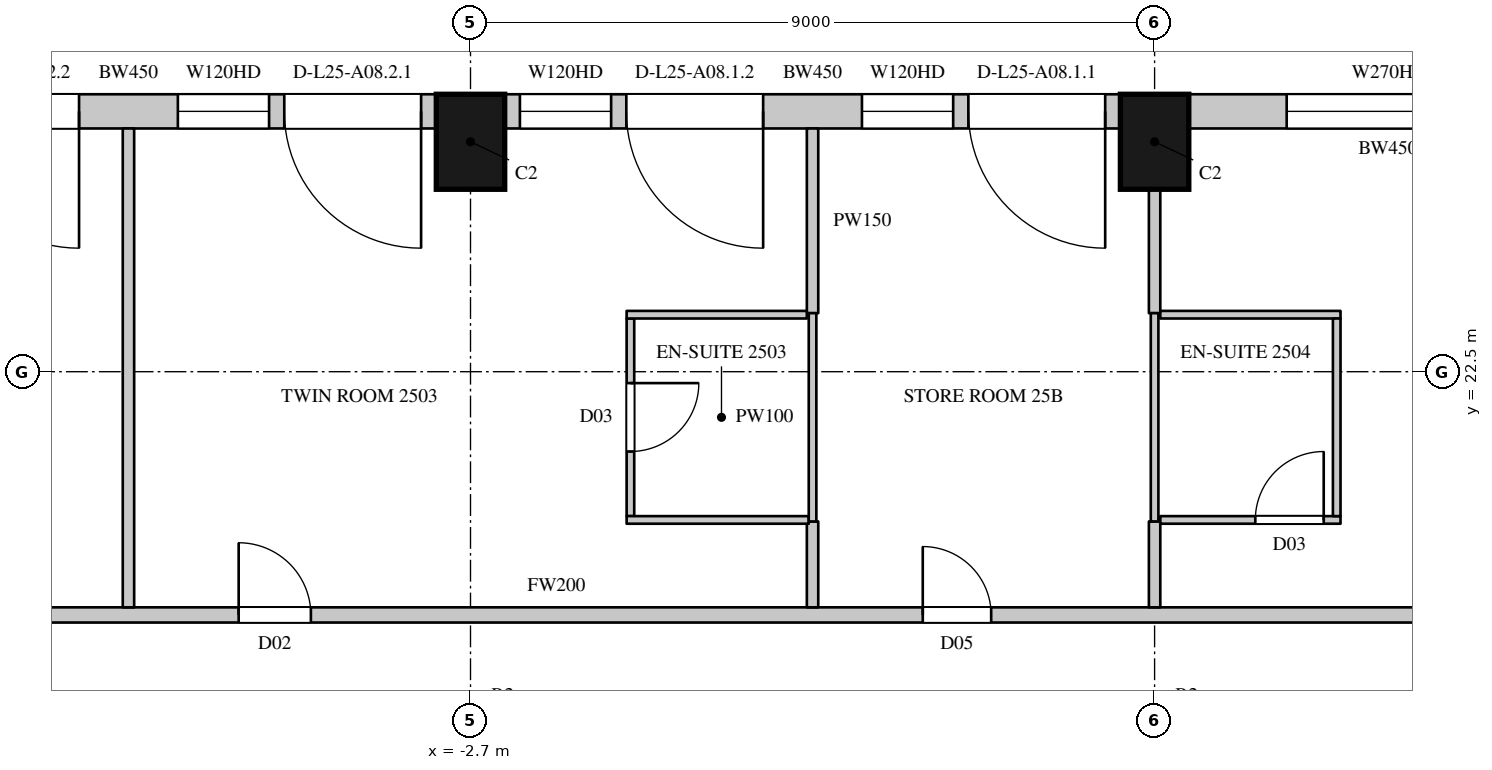
"""IFC4 building model, lengths in metres.
Left out: names, types, materials, properties, quantities, classifications, styles, units other than length and angle.
Written with IfcOpenShell. Run it as: python <this file> out.ifc"""

import sys

from ifc_helpers import new_model, si_unit, direction, frame, frame_2d, origin, origin_2d, place, context, subcontext, project, spatial, rectangle, extrude, element, fill, save


model = new_model("IFC4")
c1 = context("Model", 3, precision=1e-05, world=origin(), true_north=direction((0.0, 1.0)))
c2 = subcontext(c1, "Body", "Model", "MODEL_VIEW")
j1 = project(units=[si_unit("LENGTHUNIT", "METRE"), si_unit("PLANEANGLEUNIT", "RADIAN")], contexts=[c1])
p1 = place(None, origin())
s1 = spatial("IfcSite", under=j1, at=p1, CompositionType="ELEMENT")
p2 = place(p1, origin())
s2 = spatial("IfcBuilding", under=s1, at=p2, CompositionType="ELEMENT")
p3 = place(p2, frame((0.0, 0.0, 120.3)))
s3 = spatial("IfcBuildingStorey", under=s2, at=p3, CompositionType="ELEMENT", Elevation=120.3)
for number, where, z_axis, x_axis in (
    (1, (6.3, 25.525, 0.0), (0.0, 0.0, 1.0), (-1.0, 0.0, 0.0)),
    (2, (-2.7, 25.525, 0.0), (0.0, 0.0, 1.0), (-1.0, 0.0, 0.0)),
):
    element("IfcColumn", number, at=place(p3, frame(where, z_axis=z_axis, x_axis=x_axis)), inside=s3, PredefinedType="COLUMN", context=c2, shape_type="SweptSolid", body=[
        extrude(rectangle(XDim=0.9, YDim=1.25, at=origin_2d()), origin(), (0.0, 0.0, 1.0), 3.6),
    ])
p4 = place(p3, frame((11.989, 25.925, 0.0), z_axis=(0.0, 0.0, 1.0), x_axis=(-1.0, 0.0, 0.0)))
e3 = element("IfcWall", 3, at=p4, inside=s3, PredefinedType="SOLIDWALL", context=c2, shape_type="SweptSolid", body=[
    extrude(rectangle(XDim=5.239, YDim=0.45, at=frame_2d((2.619, 0.0))), origin(), (0.0, 0.0, 1.0), 3.3),
])
p5 = place(p4, frame((1.251, 0.0, 1.05)))
e4 = element("IfcOpeningElement", 4, at=p5, cuts=e3, PredefinedType="OPENING", context=c2, shape_type="SweptSolid", body=[
    extrude(rectangle(XDim=2.7, YDim=2.0, at=frame_2d((1.35, 1.0))), frame((0.0, 0.235, 0.0), z_axis=(0.0, -1.0, 0.0), x_axis=(1.0, 0.0, 0.0)), (0.0, 0.0, 1.0), 0.47),
])
p6 = place(p3, frame((5.85, 25.925, 0.0), z_axis=(0.0, 0.0, 1.0), x_axis=(-1.0, 0.0, 0.0)))
e5 = element("IfcWall", 5, at=p6, inside=s3, PredefinedType="SOLIDWALL", context=c2, shape_type="SweptSolid", body=[
    extrude(rectangle(XDim=8.1, YDim=0.45, at=frame_2d((4.05, 0.0))), origin(), (0.0, 0.0, 1.0), 3.3),
])
p7 = place(p6, frame((0.2, 0.0, 0.0)))
e6 = element("IfcOpeningElement", 6, at=p7, cuts=e5, PredefinedType="OPENING", context=c2, shape_type="SweptSolid", body=[
    extrude(rectangle(XDim=1.8, YDim=2.4, at=frame_2d((0.9, 1.2))), frame((0.0, 0.235, 0.0), z_axis=(0.0, -1.0, 0.0), x_axis=(1.0, 0.0, 0.0)), (0.0, 0.0, 1.0), 0.47),
])
p8 = place(p6, frame((2.2, 0.0, 1.05)))
e7 = element("IfcOpeningElement", 7, at=p8, cuts=e5, PredefinedType="OPENING", context=c2, shape_type="SweptSolid", body=[
    extrude(rectangle(XDim=1.2, YDim=2.0, at=frame_2d((0.6, 1.0))), frame((0.0, 0.235, 0.0), z_axis=(0.0, -1.0, 0.0), x_axis=(1.0, 0.0, 0.0)), (0.0, 0.0, 1.0), 0.47),
])
p9 = place(p6, frame((4.7, 0.0, 0.0)))
e8 = element("IfcOpeningElement", 8, at=p9, cuts=e5, PredefinedType="OPENING", context=c2, shape_type="SweptSolid", body=[
    extrude(rectangle(XDim=1.8, YDim=2.4, at=frame_2d((0.9, 1.2))), frame((0.0, 0.235, 0.0), z_axis=(0.0, -1.0, 0.0), x_axis=(1.0, 0.0, 0.0)), (0.0, 0.0, 1.0), 0.47),
])
p10 = place(p6, frame((6.7, 0.0, 1.05)))
e9 = element("IfcOpeningElement", 9, at=p10, cuts=e5, PredefinedType="OPENING", context=c2, shape_type="SweptSolid", body=[
    extrude(rectangle(XDim=1.2, YDim=2.0, at=frame_2d((0.6, 1.0))), frame((0.0, 0.235, 0.0), z_axis=(0.0, -1.0, 0.0), x_axis=(1.0, 0.0, 0.0)), (0.0, 0.0, 1.0), 0.47),
])
p11 = place(p3, frame((-3.15, 25.925, 0.0), z_axis=(0.0, 0.0, 1.0), x_axis=(-1.0, 0.0, 0.0)))
e10 = element("IfcWall", 10, at=p11, inside=s3, PredefinedType="SOLIDWALL", context=c2, shape_type="SweptSolid", body=[
    extrude(rectangle(XDim=8.1, YDim=0.45, at=frame_2d((4.05, 0.0))), origin(), (0.0, 0.0, 1.0), 3.3),
])
p12 = place(p11, frame((0.2, 0.0, 0.0)))
e11 = element("IfcOpeningElement", 11, at=p12, cuts=e10, PredefinedType="OPENING", context=c2, shape_type="SweptSolid", body=[
    extrude(rectangle(XDim=1.8, YDim=2.4, at=frame_2d((0.9, 1.2))), frame((0.0, 0.235, 0.0), z_axis=(0.0, -1.0, 0.0), x_axis=(1.0, 0.0, 0.0)), (0.0, 0.0, 1.0), 0.47),
])
p13 = place(p11, frame((2.2, 0.0, 1.05)))
e12 = element("IfcOpeningElement", 12, at=p13, cuts=e10, PredefinedType="OPENING", context=c2, shape_type="SweptSolid", body=[
    extrude(rectangle(XDim=1.2, YDim=2.0, at=frame_2d((0.6, 1.0))), frame((0.0, 0.235, 0.0), z_axis=(0.0, -1.0, 0.0), x_axis=(1.0, 0.0, 0.0)), (0.0, 0.0, 1.0), 0.47),
])
p14 = place(p11, frame((4.7, 0.0, 0.0)))
e13 = element("IfcOpeningElement", 13, at=p14, cuts=e10, PredefinedType="OPENING", context=c2, shape_type="SweptSolid", body=[
    extrude(rectangle(XDim=1.8, YDim=2.4, at=frame_2d((0.9, 1.2))), frame((0.0, 0.235, 0.0), z_axis=(0.0, -1.0, 0.0), x_axis=(1.0, 0.0, 0.0)), (0.0, 0.0, 1.0), 0.47),
])
p15 = place(p11, frame((6.7, 0.0, 1.05)))
e14 = element("IfcOpeningElement", 14, at=p15, cuts=e10, PredefinedType="OPENING", context=c2, shape_type="SweptSolid", body=[
    extrude(rectangle(XDim=1.2, YDim=2.0, at=frame_2d((0.6, 1.0))), frame((0.0, 0.235, 0.0), z_axis=(0.0, -1.0, 0.0), x_axis=(1.0, 0.0, 0.0)), (0.0, 0.0, 1.0), 0.47),
])
p16 = place(p3, frame((-20.8, 19.3, 0.0), z_axis=(0.0, 0.0, 1.0), x_axis=(1.0, 0.0, 0.0)))
e15 = element("IfcWall", 15, at=p16, inside=s3, PredefinedType="PARTITIONING", context=c2, shape_type="SweptSolid", body=[
    extrude(rectangle(XDim=38.464, YDim=0.2, at=frame_2d((19.232, 0.0))), origin(), (0.0, 0.0, 1.0), 3.3),
])
p17 = place(p16, frame((24.05, 0.0, 0.0)))
e16 = element("IfcOpeningElement", 16, at=p17, cuts=e15, PredefinedType="OPENING", context=c2, shape_type="SweptSolid", body=[
    extrude(rectangle(XDim=0.9, YDim=2.2, at=frame_2d((0.45, 1.1))), frame((0.0, 0.11, 0.0), z_axis=(0.0, -1.0, 0.0), x_axis=(1.0, 0.0, 0.0)), (0.0, 0.0, 1.0), 0.22),
])
p18 = place(p16, frame((11.2, 0.0, 0.0)))
e17 = element("IfcOpeningElement", 17, at=p18, cuts=e15, PredefinedType="OPENING", context=c2, shape_type="SweptSolid", body=[
    extrude(rectangle(XDim=0.95, YDim=2.2, at=frame_2d((0.475, 1.1))), frame((0.0, 0.11, 0.0), z_axis=(0.0, -1.0, 0.0), x_axis=(1.0, 0.0, 0.0)), (0.0, 0.0, 1.0), 0.22),
])
p19 = place(p16, frame((15.05, 0.0, 0.0)))
e18 = element("IfcOpeningElement", 18, at=p19, cuts=e15, PredefinedType="OPENING", context=c2, shape_type="SweptSolid", body=[
    extrude(rectangle(XDim=0.95, YDim=2.2, at=frame_2d((0.475, 1.1))), frame((0.0, 0.11, 0.0), z_axis=(0.0, -1.0, 0.0), x_axis=(1.0, 0.0, 0.0)), (0.0, 0.0, 1.0), 0.22),
])
p20 = place(p16, frame((32.0, 0.0, 0.0)))
e19 = element("IfcOpeningElement", 19, at=p20, cuts=e15, PredefinedType="OPENING", context=c2, shape_type="SweptSolid", body=[
    extrude(rectangle(XDim=0.95, YDim=2.2, at=frame_2d((0.475, 1.1))), frame((0.0, 0.11, 0.0), z_axis=(0.0, -1.0, 0.0), x_axis=(1.0, 0.0, 0.0)), (0.0, 0.0, 1.0), 0.22),
])
p21 = place(p3, frame((-7.2, 19.4, 0.0), z_axis=(0.0, 0.0, 1.0), x_axis=(0.0, 1.0, 0.0)))
e20 = element("IfcWall", 20, at=p21, inside=s3, PredefinedType="PARTITIONING", context=c2, shape_type="SweptSolid", body=[
    extrude(rectangle(XDim=6.3, YDim=0.15, at=frame_2d((3.15, 0.0))), origin(), (0.0, 0.0, 1.0), 2.65),
])
p22 = place(p3, frame((1.8, 19.4, 0.0), z_axis=(0.0, 0.0, 1.0), x_axis=(0.0, 1.0, 0.0)))
e21 = element("IfcWall", 21, at=p22, inside=s3, PredefinedType="PARTITIONING", context=c2, shape_type="SweptSolid", body=[
    extrude(rectangle(XDim=1.13, YDim=0.15, at=frame_2d((0.565, 0.0))), origin(), (0.0, 0.0, 1.0), 2.65),
])
p23 = place(p3, frame((1.8, 23.27, 0.0), z_axis=(0.0, 0.0, 1.0), x_axis=(0.0, 1.0, 0.0)))
e22 = element("IfcWall", 22, at=p23, inside=s3, PredefinedType="PARTITIONING", context=c2, shape_type="SweptSolid", body=[
    extrude(rectangle(XDim=2.43, YDim=0.15, at=frame_2d((1.215, 0.0))), origin(), (0.0, 0.0, 1.0), 2.65),
])
p24 = place(p3, frame((6.3, 19.4, 0.0), z_axis=(0.0, 0.0, 1.0), x_axis=(0.0, 1.0, 0.0)))
e23 = element("IfcWall", 23, at=p24, inside=s3, PredefinedType="PARTITIONING", context=c2, shape_type="SweptSolid", body=[
    extrude(rectangle(XDim=1.13, YDim=0.15, at=frame_2d((0.565, 0.0))), origin(), (0.0, 0.0, 1.0), 2.75),
])
p25 = place(p3, frame((6.3, 23.27, 0.0), z_axis=(0.0, 0.0, 1.0), x_axis=(0.0, 1.0, 0.0)))
e24 = element("IfcWall", 24, at=p25, inside=s3, PredefinedType="PARTITIONING", context=c2, shape_type="SweptSolid", body=[
    extrude(rectangle(XDim=1.63, YDim=0.15, at=frame_2d((0.815, 0.0))), origin(), (0.0, 0.0, 1.0), 2.75),
])
p26 = place(p3, frame((-0.596, 20.6, 0.0), z_axis=(0.0, 0.0, 1.0), x_axis=(0.0, 1.0, 0.0)))
e25 = element("IfcWall", 25, at=p26, inside=s3, PredefinedType="PARTITIONING", context=c2, shape_type="SweptSolid", body=[
    extrude(rectangle(XDim=2.6, YDim=0.1, at=frame_2d((1.3, 0.0))), origin(), (0.0, 0.0, 1.0), 3.3),
])
p27 = place(p26, frame((0.85, 0.0, 0.0)))
e26 = element("IfcOpeningElement", 26, at=p27, cuts=e25, PredefinedType="OPENING", context=c2, shape_type="SweptSolid", body=[
    extrude(rectangle(XDim=0.9, YDim=2.2, at=frame_2d((0.45, 1.1))), frame((0.0, 0.06, 0.0), z_axis=(0.0, -1.0, 0.0), x_axis=(1.0, 0.0, 0.0)), (0.0, 0.0, 1.0), 0.12),
])
p28 = place(p3, frame((-0.646, 20.55, 0.0), z_axis=(0.0, 0.0, 1.0), x_axis=(1.0, 0.0, 0.0)))
e27 = element("IfcWall", 27, at=p28, inside=s3, PredefinedType="PARTITIONING", context=c2, shape_type="SweptSolid", body=[
    extrude(rectangle(XDim=2.396, YDim=0.1, at=frame_2d((1.198, 0.0))), origin(), (0.0, 0.0, 1.0), 3.3),
])
p29 = place(p3, frame((-0.646, 23.25, 0.0), z_axis=(0.0, 0.0, 1.0), x_axis=(1.0, 0.0, 0.0)))
e28 = element("IfcWall", 28, at=p29, inside=s3, PredefinedType="PARTITIONING", context=c2, shape_type="SweptSolid", body=[
    extrude(rectangle(XDim=2.371, YDim=0.1, at=frame_2d((1.186, 0.0))), origin(), (0.0, 0.0, 1.0), 3.3),
])
p30 = place(p3, frame((1.8, 20.53, 0.0), z_axis=(0.0, 0.0, 1.0), x_axis=(0.0, 1.0, 0.0)))
e29 = element("IfcWall", 29, at=p30, inside=s3, PredefinedType="PARTITIONING", context=c2, shape_type="SweptSolid", body=[
    extrude(rectangle(XDim=2.74, YDim=0.1, at=frame_2d((1.37, 0.0))), origin(), (0.0, 0.0, 1.0), 2.65),
])
p31 = place(p3, frame((6.3, 20.53, 0.0), z_axis=(0.0, 0.0, 1.0), x_axis=(0.0, 1.0, 0.0)))
e30 = element("IfcWall", 30, at=p31, inside=s3, PredefinedType="PARTITIONING", context=c2, shape_type="SweptSolid", body=[
    extrude(rectangle(XDim=2.74, YDim=0.1, at=frame_2d((1.37, 0.0))), origin(), (0.0, 0.0, 1.0), 2.75),
])
p32 = place(p3, frame((6.375, 20.55, 0.0), z_axis=(0.0, 0.0, 1.0), x_axis=(1.0, 0.0, 0.0)))
e31 = element("IfcWall", 31, at=p32, inside=s3, PredefinedType="PARTITIONING", context=c2, shape_type="SweptSolid", body=[
    extrude(rectangle(XDim=2.371, YDim=0.1, at=frame_2d((1.186, 0.0))), origin(), (0.0, 0.0, 1.0), 3.3),
])
p33 = place(p32, frame((1.25, 0.0, 0.0)))
e32 = element("IfcOpeningElement", 32, at=p33, cuts=e31, PredefinedType="OPENING", context=c2, shape_type="SweptSolid", body=[
    extrude(rectangle(XDim=0.9, YDim=2.2, at=frame_2d((0.45, 1.1))), frame((0.0, 0.06, 0.0), z_axis=(0.0, -1.0, 0.0), x_axis=(1.0, 0.0, 0.0)), (0.0, 0.0, 1.0), 0.12),
])
p34 = place(p3, frame((6.375, 23.25, 0.0), z_axis=(0.0, 0.0, 1.0), x_axis=(1.0, 0.0, 0.0)))
e33 = element("IfcWall", 33, at=p34, inside=s3, PredefinedType="PARTITIONING", context=c2, shape_type="SweptSolid", body=[
    extrude(rectangle(XDim=2.371, YDim=0.1, at=frame_2d((1.186, 0.0))), origin(), (0.0, 0.0, 1.0), 3.3),
])
p35 = place(p3, frame((8.696, 20.6, 0.0), z_axis=(0.0, 0.0, 1.0), x_axis=(0.0, 1.0, 0.0)))
e34 = element("IfcWall", 34, at=p35, inside=s3, PredefinedType="PARTITIONING", context=c2, shape_type="SweptSolid", body=[
    extrude(rectangle(XDim=2.6, YDim=0.1, at=frame_2d((1.3, 0.0))), origin(), (0.0, 0.0, 1.0), 3.3),
])
p36 = place(p5, origin())
e35 = element("IfcWindow", 35, at=p36, inside=s3, PartitioningType="SINGLE_PANEL", PredefinedType="WINDOW", context=c2, shape_type="SweptSolid", body=[
    extrude(rectangle(XDim=2.7, YDim=2.0, at=frame_2d((1.35, 1.0))), frame((0.0, 0.135, 0.0), z_axis=(0.0, -1.0, 0.0), x_axis=(1.0, 0.0, 0.0)), (0.0, 0.0, 1.0), 0.06),
])
fill(e4, e35)
p37 = place(p7, origin())
e36 = element("IfcDoor", 36, at=p37, inside=s3, OperationType="SLIDING_TO_LEFT", PredefinedType="DOOR", context=c2, shape_type="SweptSolid", body=[
    extrude(rectangle(XDim=1.8, YDim=2.4, at=frame_2d((0.9, 1.2))), frame((0.0, 0.13, 0.0), z_axis=(0.0, -1.0, 0.0), x_axis=(1.0, 0.0, 0.0)), (0.0, 0.0, 1.0), 0.05),
])
fill(e6, e36)
p38 = place(p8, origin())
e37 = element("IfcWindow", 37, at=p38, inside=s3, PartitioningType="SINGLE_PANEL", PredefinedType="WINDOW", context=c2, shape_type="SweptSolid", body=[
    extrude(rectangle(XDim=1.2, YDim=2.0, at=frame_2d((0.6, 1.0))), frame((0.0, 0.135, 0.0), z_axis=(0.0, -1.0, 0.0), x_axis=(1.0, 0.0, 0.0)), (0.0, 0.0, 1.0), 0.06),
])
fill(e7, e37)
p39 = place(p9, origin())
e38 = element("IfcDoor", 38, at=p39, inside=s3, OperationType="SLIDING_TO_LEFT", PredefinedType="DOOR", context=c2, shape_type="SweptSolid", body=[
    extrude(rectangle(XDim=1.8, YDim=2.4, at=frame_2d((0.9, 1.2))), frame((0.0, 0.13, 0.0), z_axis=(0.0, -1.0, 0.0), x_axis=(1.0, 0.0, 0.0)), (0.0, 0.0, 1.0), 0.05),
])
fill(e8, e38)
p40 = place(p10, origin())
e39 = element("IfcWindow", 39, at=p40, inside=s3, PartitioningType="SINGLE_PANEL", PredefinedType="WINDOW", context=c2, shape_type="SweptSolid", body=[
    extrude(rectangle(XDim=1.2, YDim=2.0, at=frame_2d((0.6, 1.0))), frame((0.0, 0.135, 0.0), z_axis=(0.0, -1.0, 0.0), x_axis=(1.0, 0.0, 0.0)), (0.0, 0.0, 1.0), 0.06),
])
fill(e9, e39)
p41 = place(p12, origin())
e40 = element("IfcDoor", 40, at=p41, inside=s3, OperationType="SLIDING_TO_LEFT", PredefinedType="DOOR", context=c2, shape_type="SweptSolid", body=[
    extrude(rectangle(XDim=1.8, YDim=2.4, at=frame_2d((0.9, 1.2))), frame((0.0, 0.13, 0.0), z_axis=(0.0, -1.0, 0.0), x_axis=(1.0, 0.0, 0.0)), (0.0, 0.0, 1.0), 0.05),
])
fill(e11, e40)
p42 = place(p13, origin())
e41 = element("IfcWindow", 41, at=p42, inside=s3, PartitioningType="SINGLE_PANEL", PredefinedType="WINDOW", context=c2, shape_type="SweptSolid", body=[
    extrude(rectangle(XDim=1.2, YDim=2.0, at=frame_2d((0.6, 1.0))), frame((0.0, 0.135, 0.0), z_axis=(0.0, -1.0, 0.0), x_axis=(1.0, 0.0, 0.0)), (0.0, 0.0, 1.0), 0.06),
])
fill(e12, e41)
p43 = place(p14, origin())
e42 = element("IfcDoor", 42, at=p43, inside=s3, OperationType="SLIDING_TO_LEFT", PredefinedType="DOOR", context=c2, shape_type="SweptSolid", body=[
    extrude(rectangle(XDim=1.8, YDim=2.4, at=frame_2d((0.9, 1.2))), frame((0.0, 0.13, 0.0), z_axis=(0.0, -1.0, 0.0), x_axis=(1.0, 0.0, 0.0)), (0.0, 0.0, 1.0), 0.05),
])
fill(e13, e42)
p44 = place(p17, origin())
e43 = element("IfcDoor", 43, at=p44, inside=s3, OperationType="SINGLE_SWING_LEFT", PredefinedType="DOOR", context=c2, shape_type="SweptSolid", body=[
    extrude(rectangle(XDim=0.9, YDim=2.2, at=frame_2d((0.45, 1.1))), frame((0.0, 0.025, 0.0), z_axis=(0.0, -1.0, 0.0), x_axis=(1.0, 0.0, 0.0)), (0.0, 0.0, 1.0), 0.05),
])
fill(e16, e43)
p45 = place(p19, origin())
e44 = element("IfcDoor", 44, at=p45, inside=s3, OperationType="SINGLE_SWING_LEFT", PredefinedType="DOOR", context=c2, shape_type="SweptSolid", body=[
    extrude(rectangle(XDim=0.95, YDim=2.2, at=frame_2d((0.475, 1.1))), frame((0.0, 0.025, 0.0), z_axis=(0.0, -1.0, 0.0), x_axis=(1.0, 0.0, 0.0)), (0.0, 0.0, 1.0), 0.05),
])
fill(e18, e44)
p46 = place(p27, origin())
e45 = element("IfcDoor", 45, at=p46, inside=s3, OperationType="SINGLE_SWING_LEFT", PredefinedType="DOOR", context=c2, shape_type="SweptSolid", body=[
    extrude(rectangle(XDim=0.9, YDim=2.2, at=frame_2d((0.45, 1.1))), frame((0.0, 0.025, 0.0), z_axis=(0.0, -1.0, 0.0), x_axis=(1.0, 0.0, 0.0)), (0.0, 0.0, 1.0), 0.05),
])
fill(e26, e45)
p47 = place(p33, origin())
e46 = element("IfcDoor", 46, at=p47, inside=s3, OperationType="SINGLE_SWING_RIGHT", PredefinedType="DOOR", context=c2, shape_type="SweptSolid", body=[
    extrude(rectangle(XDim=0.9, YDim=2.2, at=frame_2d((0.45, 1.1))), frame((0.0, 0.025, 0.0), z_axis=(0.0, -1.0, 0.0), x_axis=(1.0, 0.0, 0.0)), (0.0, 0.0, 1.0), 0.05),
])
fill(e32, e46)
save(model, sys.argv[1])
